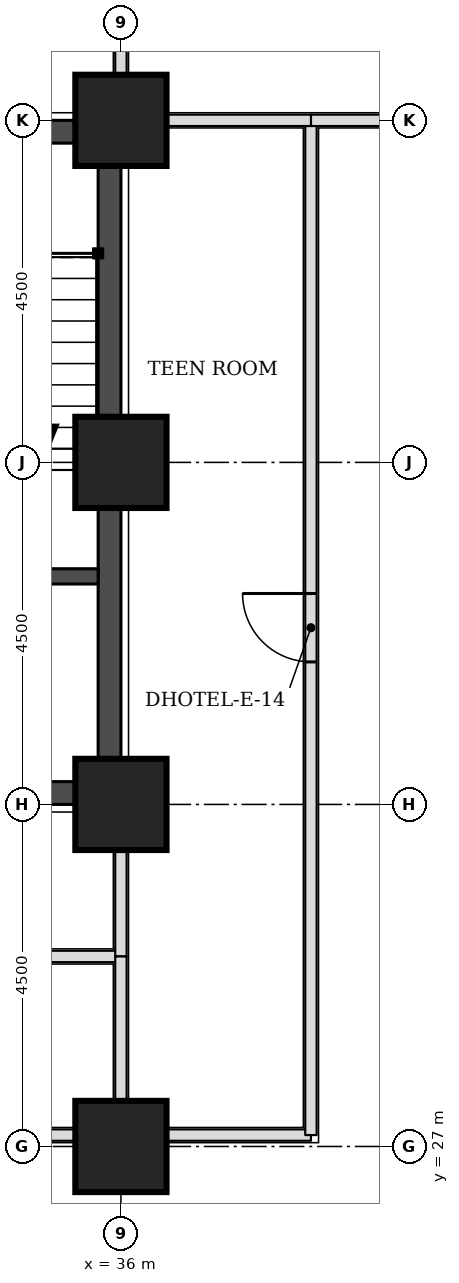
"""IFC4 building model, lengths in metres.
Left out: names, types, materials, properties, quantities, classifications, styles, units other than length and angle.
Written with IfcOpenShell. Run it as: python <this file> out.ifc"""

import sys

from ifc_helpers import new_model, si_unit, direction, frame, frame_2d, origin, origin_2d, place, context, subcontext, project, spatial, rectangle, extrude, element, fill, save


model = new_model("IFC4")
c1 = context("Model", 3, precision=1e-05, world=origin(), true_north=direction((0.0, 1.0)))
c2 = subcontext(c1, "Body", "Model", "MODEL_VIEW")
j1 = project(units=[si_unit("LENGTHUNIT", "METRE"), si_unit("PLANEANGLEUNIT", "RADIAN")], contexts=[c1])
p1 = place(None, origin())
s1 = spatial("IfcSite", under=j1, at=p1, CompositionType="ELEMENT")
p2 = place(p1, origin())
s2 = spatial("IfcBuilding", under=s1, at=p2, CompositionType="ELEMENT")
p3 = place(p2, frame((0.0, 0.0, 62.7)))
s3 = spatial("IfcBuildingStorey", under=s2, at=p3, CompositionType="ELEMENT", Elevation=62.7)
for number, where, z_axis, x_axis in (
    (1, (36.0, 27.0, 0.0), (0.0, 0.0, 1.0), (1.0, 0.0, 0.0)),
    (2, (36.0, 31.5, 0.0), (0.0, 0.0, 1.0), (1.0, 0.0, 0.0)),
    (3, (36.0, 36.0, 0.0), (0.0, 0.0, 1.0), (1.0, 0.0, 0.0)),
    (4, (36.0, 40.5, 0.0), (0.0, 0.0, 1.0), (1.0, 0.0, 0.0)),
):
    element("IfcColumn", number, at=place(p3, frame(where, z_axis=z_axis, x_axis=x_axis)), inside=s3, PredefinedType="COLUMN", context=c2, shape_type="SweptSolid", body=[
        extrude(rectangle(XDim=1.2, YDim=1.2, at=origin_2d()), origin(), (0.0, 0.0, 1.0), 3.3),
    ])
p4 = place(p3, frame((27.3, 31.65, 0.0), z_axis=(0.0, 0.0, 1.0), x_axis=(1.0, 0.0, 0.0)))
e5 = element("IfcWall", 5, at=p4, inside=s3, PredefinedType="SHEAR", context=c2, shape_type="SweptSolid", body=[
    extrude(rectangle(XDim=8.4, YDim=0.3, at=frame_2d((4.2, 0.0))), origin(), (0.0, 0.0, 1.0), 3.3),
])
p5 = place(p4, frame((4.8, 0.0, 0.0)))
e6 = element("IfcOpeningElement", 6, at=p5, cuts=e5, PredefinedType="OPENING", context=c2, shape_type="SweptSolid", body=[
    extrude(rectangle(XDim=1.8, YDim=2.1, at=frame_2d((0.9, 1.05))), frame((0.0, 0.16, 0.0), z_axis=(0.0, -1.0, 0.0), x_axis=(1.0, 0.0, 0.0)), (0.0, 0.0, 1.0), 0.32),
])
p6 = place(p3, frame((27.3, 40.35, 0.0), z_axis=(0.0, 0.0, 1.0), x_axis=(1.0, 0.0, 0.0)))
e7 = element("IfcWall", 7, at=p6, inside=s3, PredefinedType="SHEAR", context=c2, shape_type="SweptSolid", body=[
    extrude(rectangle(XDim=8.4, YDim=0.3, at=frame_2d((4.2, 0.0))), origin(), (0.0, 0.0, 1.0), 3.3),
])
p7 = place(p6, frame((6.4, 0.0, 0.0)))
e8 = element("IfcOpeningElement", 8, at=p7, cuts=e7, PredefinedType="OPENING", context=c2, shape_type="SweptSolid", body=[
    extrude(rectangle(XDim=1.1, YDim=2.1, at=frame_2d((0.55, 1.05))), frame((0.0, 0.16, 0.0), z_axis=(0.0, -1.0, 0.0), x_axis=(1.0, 0.0, 0.0)), (0.0, 0.0, 1.0), 0.32),
])
p8 = place(p3, frame((35.85, 31.5, 0.0), z_axis=(0.0, 0.0, 1.0), x_axis=(0.0, 1.0, 0.0)))
e9 = element("IfcWall", 9, at=p8, inside=s3, PredefinedType="SHEAR", context=c2, shape_type="SweptSolid", body=[
    extrude(rectangle(XDim=9.0, YDim=0.3, at=frame_2d((4.5, 0.0))), origin(), (0.0, 0.0, 1.0), 3.3),
])
p9 = place(p3, frame((27.0, 27.15, 0.0), z_axis=(0.0, 0.0, 1.0), x_axis=(1.0, 0.0, 0.0)))
e10 = element("IfcWall", 10, at=p9, inside=s3, PredefinedType="PARTITIONING", context=c2, shape_type="SweptSolid", body=[
    extrude(rectangle(XDim=11.5, YDim=0.15, at=frame_2d((5.75, 0.0))), origin(), (0.0, 0.0, 1.0), 3.08),
])
p10 = place(p3, frame((38.5, 27.15, 0.0), z_axis=(0.0, 0.0, 1.0), x_axis=(0.0, 1.0, 0.0)))
e11 = element("IfcWall", 11, at=p10, inside=s3, PredefinedType="PARTITIONING", context=c2, shape_type="SweptSolid", body=[
    extrude(rectangle(XDim=13.35, YDim=0.15, at=frame_2d((6.675, 0.0))), origin(), (0.0, 0.0, 1.0), 3.08),
])
p11 = place(p10, frame((6.225, 0.0, 0.0)))
e12 = element("IfcOpeningElement", 12, at=p11, cuts=e11, PredefinedType="OPENING", context=c2, shape_type="SweptSolid", body=[
    extrude(rectangle(XDim=0.9, YDim=2.1, at=frame_2d((0.45, 1.05))), frame((0.0, 0.085, 0.0), z_axis=(0.0, -1.0, 0.0), x_axis=(1.0, 0.0, 0.0)), (0.0, 0.0, 1.0), 0.17),
])
p12 = place(p3, frame((27.0, 29.5, 0.0), z_axis=(0.0, 0.0, 1.0), x_axis=(1.0, 0.0, 0.0)))
e13 = element("IfcWall", 13, at=p12, inside=s3, PredefinedType="PARTITIONING", context=c2, shape_type="SweptSolid", body=[
    extrude(rectangle(XDim=9.0, YDim=0.15, at=frame_2d((4.5, 0.0))), origin(), (0.0, 0.0, 1.0), 3.08),
])
p13 = place(p12, frame((4.05, 0.0, 0.0)))
e14 = element("IfcOpeningElement", 14, at=p13, cuts=e13, PredefinedType="OPENING", context=c2, shape_type="SweptSolid", body=[
    extrude(rectangle(XDim=0.9, YDim=2.1, at=frame_2d((0.45, 1.05))), frame((0.0, 0.085, 0.0), z_axis=(0.0, -1.0, 0.0), x_axis=(1.0, 0.0, 0.0)), (0.0, 0.0, 1.0), 0.17),
])
for number, where, z_axis, x_axis in (
    (15, (36.0, 29.5, 0.0), (0.0, 0.0, 1.0), (0.0, 1.0, 0.0)),
    (16, (38.5, 40.5, 0.0), (0.0, 0.0, 1.0), (1.0, 0.0, 0.0)),
):
    element("IfcWall", number, at=place(p3, frame(where, z_axis=z_axis, x_axis=x_axis)), inside=s3, PredefinedType="PARTITIONING", context=c2, shape_type="SweptSolid", body=[
        extrude(rectangle(XDim=1.95, YDim=0.15, at=frame_2d((0.975, 0.0))), origin(), (0.0, 0.0, 1.0), 2.33),
    ])
p14 = place(p3, frame((36.0, 40.55, 0.0), z_axis=(0.0, 0.0, 1.0), x_axis=(0.0, 1.0, 0.0)))
e17 = element("IfcWall", 17, at=p14, inside=s3, PredefinedType="PARTITIONING", context=c2, shape_type="SweptSolid", body=[
    extrude(rectangle(XDim=4.4, YDim=0.15, at=frame_2d((2.2, 0.0))), origin(), (0.0, 0.0, 1.0), 2.33),
])
p15 = place(p3, frame((36.0, 27.15, 0.0), z_axis=(0.0, 0.0, 1.0), x_axis=(0.0, 1.0, 0.0)))
e18 = element("IfcWall", 18, at=p15, inside=s3, PredefinedType="PARTITIONING", context=c2, shape_type="SweptSolid", body=[
    extrude(rectangle(XDim=2.35, YDim=0.15, at=frame_2d((1.175, 0.0))), origin(), (0.0, 0.0, 1.0), 2.33),
])
p16 = place(p3, frame((36.05, 40.5, 0.0), z_axis=(0.0, 0.0, 1.0), x_axis=(1.0, 0.0, 0.0)))
e19 = element("IfcWall", 19, at=p16, inside=s3, PredefinedType="PARTITIONING", context=c2, shape_type="SweptSolid", body=[
    extrude(rectangle(XDim=2.45, YDim=0.15, at=frame_2d((1.225, 0.0))), origin(), (0.0, 0.0, 1.0), 2.33),
])
p17 = place(p3, frame((30.3, 34.5, 0.0), z_axis=(0.0, 0.0, 1.0), x_axis=(1.0, 0.0, 0.0)))
e20 = element("IfcWall", 20, at=p17, inside=s3, PredefinedType="SOLIDWALL", context=c2, shape_type="SweptSolid", body=[
    extrude(rectangle(XDim=5.4, YDim=0.2, at=frame_2d((2.7, 0.0))), origin(), (0.0, 0.0, 1.0), 3.08),
])
p18 = place(p17, frame((0.45, 0.0, 0.0)))
e21 = element("IfcOpeningElement", 21, at=p18, cuts=e20, PredefinedType="OPENING", context=c2, shape_type="SweptSolid", body=[
    extrude(rectangle(XDim=1.5, YDim=2.1, at=frame_2d((0.75, 1.05))), frame((0.0, 0.11, 0.0), z_axis=(0.0, -1.0, 0.0), x_axis=(1.0, 0.0, 0.0)), (0.0, 0.0, 1.0), 0.22),
])
p19 = place(p11, origin())
e22 = element("IfcDoor", 22, at=p19, inside=s3, OperationType="SINGLE_SWING_RIGHT", PredefinedType="DOOR", context=c2, shape_type="SweptSolid", body=[
    extrude(rectangle(XDim=0.9, YDim=2.1, at=frame_2d((0.45, 1.05))), frame((0.0, 0.025, 0.0), z_axis=(0.0, -1.0, 0.0), x_axis=(1.0, 0.0, 0.0)), (0.0, 0.0, 1.0), 0.05),
])
fill(e12, e22)
save(model, sys.argv[1])
